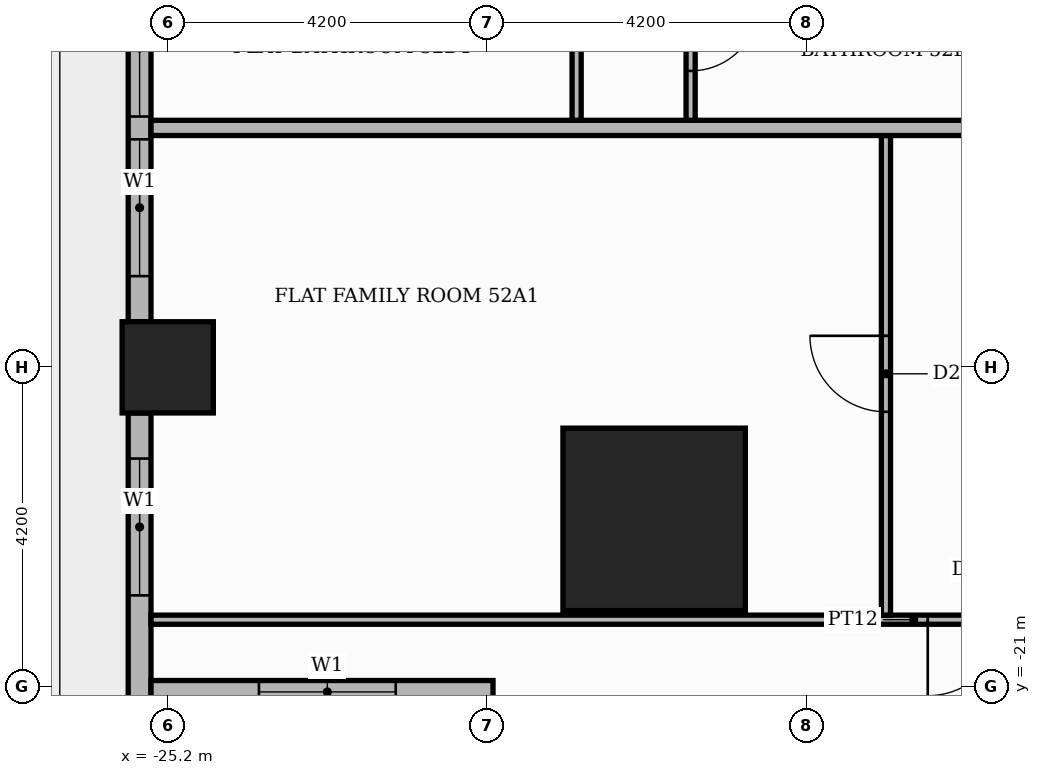
"""IFC4 building model, lengths in metres.
Left out: names, types, materials, properties, quantities, classifications, styles, units other than length and angle.
Written with IfcOpenShell. Run it as: python <this file> out.ifc"""

import sys

from ifc_helpers import new_model, si_unit, direction, frame, frame_2d, origin, origin_2d, place, context, subcontext, project, spatial, rectangle, extrude, element, fill, save


model = new_model("IFC4")
c1 = context("Model", 3, precision=1e-05, world=origin(), true_north=direction((0.0, 1.0)))
c2 = subcontext(c1, "Body", "Model", "MODEL_VIEW")
j1 = project(units=[si_unit("LENGTHUNIT", "METRE"), si_unit("PLANEANGLEUNIT", "RADIAN")], contexts=[c1])
p1 = place(None, origin())
s1 = spatial("IfcSite", under=j1, at=p1, CompositionType="ELEMENT")
p2 = place(p1, origin())
s2 = spatial("IfcBuilding", under=s1, at=p2, CompositionType="ELEMENT")
p3 = place(p2, frame((0.0, 0.0, 219.6)))
s3 = spatial("IfcBuildingStorey", under=s2, at=p3, CompositionType="ELEMENT", Elevation=219.6)
p4 = place(p3, frame((-18.8, -18.8, 0.0), z_axis=(0.0, 0.0, 1.0), x_axis=(1.0, 0.0, 0.0)))
e1 = element("IfcColumn", 1, at=p4, inside=s3, PredefinedType="COLUMN", context=c2, shape_type="SweptSolid", body=[
    extrude(rectangle(XDim=2.4, YDim=2.4, at=origin_2d()), origin(), (0.0, 0.0, 1.0), 3.9),
])
p5 = place(p3, frame((-25.2, -16.8, 0.0), z_axis=(0.0, 0.0, 1.0), x_axis=(1.0, 0.0, 0.0)))
e2 = element("IfcColumn", 2, at=p5, inside=s3, PredefinedType="COLUMN", context=c2, shape_type="SweptSolid", body=[
    extrude(rectangle(XDim=1.2, YDim=1.2, at=origin_2d()), origin(), (0.0, 0.0, 1.0), 3.9),
])
p6 = place(p3, frame((-25.57, -9.0, 0.0), z_axis=(0.0, 0.0, 1.0), x_axis=(0.0, -1.0, 0.0)))
e3 = element("IfcWall", 3, at=p6, inside=s3, PredefinedType="STANDARD", context=c2, shape_type="SweptSolid", body=[
    extrude(rectangle(XDim=7.2, YDim=0.3, at=frame_2d((3.6, 0.0))), origin(), (0.0, 0.0, 1.0), 3.48),
])
p7 = place(p6, frame((0.6, 0.0, 0.9)))
e4 = element("IfcOpeningElement", 4, at=p7, cuts=e3, PredefinedType="OPENING", context=c2, shape_type="SweptSolid", body=[
    extrude(rectangle(XDim=1.8, YDim=2.1, at=frame_2d((0.9, 1.05))), frame((0.0, 0.16, 0.0), z_axis=(0.0, -1.0, 0.0), x_axis=(1.0, 0.0, 0.0)), (0.0, 0.0, 1.0), 0.32),
])
p8 = place(p6, frame((2.7, 0.0, 0.9)))
e5 = element("IfcOpeningElement", 5, at=p8, cuts=e3, PredefinedType="OPENING", context=c2, shape_type="SweptSolid", body=[
    extrude(rectangle(XDim=1.8, YDim=2.1, at=frame_2d((0.9, 1.05))), frame((0.0, 0.16, 0.0), z_axis=(0.0, -1.0, 0.0), x_axis=(1.0, 0.0, 0.0)), (0.0, 0.0, 1.0), 0.32),
])
p9 = place(p6, frame((4.8, 0.0, 0.9)))
e6 = element("IfcOpeningElement", 6, at=p9, cuts=e3, PredefinedType="OPENING", context=c2, shape_type="SweptSolid", body=[
    extrude(rectangle(XDim=1.8, YDim=2.1, at=frame_2d((0.9, 1.05))), frame((0.0, 0.16, 0.0), z_axis=(0.0, -1.0, 0.0), x_axis=(1.0, 0.0, 0.0)), (0.0, 0.0, 1.0), 0.32),
])
p10 = place(p3, frame((-25.57, -17.4, 0.0), z_axis=(0.0, 0.0, 1.0), x_axis=(0.0, -1.0, 0.0)))
e7 = element("IfcWall", 7, at=p10, inside=s3, PredefinedType="STANDARD", context=c2, shape_type="SweptSolid", body=[
    extrude(rectangle(XDim=3.82, YDim=0.3, at=frame_2d((1.91, 0.0))), origin(), (0.0, 0.0, 1.0), 3.48),
])
p11 = place(p10, frame((0.6, 0.0, 0.9)))
e8 = element("IfcOpeningElement", 8, at=p11, cuts=e7, PredefinedType="OPENING", context=c2, shape_type="SweptSolid", body=[
    extrude(rectangle(XDim=1.8, YDim=2.1, at=frame_2d((0.9, 1.05))), frame((0.0, 0.16, 0.0), z_axis=(0.0, -1.0, 0.0), x_axis=(1.0, 0.0, 0.0)), (0.0, 0.0, 1.0), 0.32),
])
p12 = place(p3, frame((-25.42, -21.07, 0.0), z_axis=(0.0, 0.0, 1.0), x_axis=(1.0, 0.0, 0.0)))
e9 = element("IfcWall", 9, at=p12, inside=s3, PredefinedType="STANDARD", context=c2, shape_type="SweptSolid", body=[
    extrude(rectangle(XDim=4.5, YDim=0.3, at=frame_2d((2.25, 0.0))), origin(), (0.0, 0.0, 1.0), 3.48),
])
p13 = place(p12, frame((1.42, 0.0, 0.9)))
e10 = element("IfcOpeningElement", 10, at=p13, cuts=e9, PredefinedType="OPENING", context=c2, shape_type="SweptSolid", body=[
    extrude(rectangle(XDim=1.8, YDim=2.1, at=frame_2d((0.9, 1.05))), frame((0.0, 0.16, 0.0), z_axis=(0.0, -1.0, 0.0), x_axis=(1.0, 0.0, 0.0)), (0.0, 0.0, 1.0), 0.32),
])
p14 = place(p3, frame((-25.42, -20.12, 0.0), z_axis=(0.0, 0.0, 1.0), x_axis=(1.0, 0.0, 0.0)))
e11 = element("IfcWall", 11, at=p14, inside=s3, PredefinedType="PARTITIONING", context=c2, shape_type="SweptSolid", body=[
    extrude(rectangle(XDim=20.07, YDim=0.12, at=frame_2d((10.035, 0.0))), origin(), (0.0, 0.0, 1.0), 3.48),
])
p15 = place(p14, frame((10.22, 0.0, 0.0)))
e12 = element("IfcOpeningElement", 12, at=p15, cuts=e11, PredefinedType="OPENING", context=c2, shape_type="SweptSolid", body=[
    extrude(rectangle(XDim=1.0, YDim=2.1, at=frame_2d((0.5, 1.05))), frame((0.0, 0.07, 0.0), z_axis=(0.0, -1.0, 0.0), x_axis=(1.0, 0.0, 0.0)), (0.0, 0.0, 1.0), 0.14),
])
p16 = place(p14, frame((13.42, 0.0, 0.0)))
e13 = element("IfcOpeningElement", 13, at=p16, cuts=e11, PredefinedType="OPENING", context=c2, shape_type="SweptSolid", body=[
    extrude(rectangle(XDim=0.9, YDim=2.1, at=frame_2d((0.45, 1.05))), frame((0.0, 0.07, 0.0), z_axis=(0.0, -1.0, 0.0), x_axis=(1.0, 0.0, 0.0)), (0.0, 0.0, 1.0), 0.14),
])
p17 = place(p3, frame((-15.75, -20.06, 0.0), z_axis=(0.0, 0.0, 1.0), x_axis=(0.0, 1.0, 0.0)))
e14 = element("IfcWall", 14, at=p17, inside=s3, PredefinedType="PARTITIONING", context=c2, shape_type="SweptSolid", body=[
    extrude(rectangle(XDim=6.31, YDim=0.12, at=frame_2d((3.155, 0.0))), origin(), (0.0, 0.0, 1.0), 3.48),
])
p18 = place(p17, frame((2.675, 0.0, 0.0)))
e15 = element("IfcOpeningElement", 15, at=p18, cuts=e14, PredefinedType="OPENING", context=c2, shape_type="SweptSolid", body=[
    extrude(rectangle(XDim=1.0, YDim=2.1, at=frame_2d((0.5, 1.05))), frame((0.0, 0.07, 0.0), z_axis=(0.0, -1.0, 0.0), x_axis=(1.0, 0.0, 0.0)), (0.0, 0.0, 1.0), 0.14),
])
p19 = place(p3, frame((-25.42, -13.65, 0.0), z_axis=(0.0, 0.0, 1.0), x_axis=(1.0, 0.0, 0.0)))
e16 = element("IfcWall", 16, at=p19, inside=s3, PredefinedType="PARTITIONING", context=c2, shape_type="SweptSolid", body=[
    extrude(rectangle(XDim=39.07, YDim=0.2, at=frame_2d((19.535, 0.0))), origin(), (0.0, 0.0, 1.0), 3.48),
])
p20 = place(p19, frame((13.32, 0.0, 0.0)))
e17 = element("IfcOpeningElement", 17, at=p20, cuts=e16, PredefinedType="OPENING", context=c2, shape_type="SweptSolid", body=[
    extrude(rectangle(XDim=1.1, YDim=2.4, at=frame_2d((0.55, 1.2))), frame((0.0, 0.11, 0.0), z_axis=(0.0, -1.0, 0.0), x_axis=(1.0, 0.0, 0.0)), (0.0, 0.0, 1.0), 0.22),
])
p21 = place(p19, frame((21.72, 0.0, 0.0)))
e18 = element("IfcOpeningElement", 18, at=p21, cuts=e16, PredefinedType="OPENING", context=c2, shape_type="SweptSolid", body=[
    extrude(rectangle(XDim=1.1, YDim=2.4, at=frame_2d((0.55, 1.2))), frame((0.0, 0.11, 0.0), z_axis=(0.0, -1.0, 0.0), x_axis=(1.0, 0.0, 0.0)), (0.0, 0.0, 1.0), 0.22),
])
p22 = place(p3, frame((-19.82, -13.55, 0.0), z_axis=(0.0, 0.0, 1.0), x_axis=(0.0, 1.0, 0.0)))
e19 = element("IfcWall", 19, at=p22, inside=s3, PredefinedType="PARTITIONING", context=c2, shape_type="SweptSolid", body=[
    extrude(rectangle(XDim=1.94, YDim=0.12, at=frame_2d((0.97, 0.0))), origin(), (0.0, 0.0, 1.0), 3.48),
])
p23 = place(p3, frame((-18.32, -13.55, 0.0), z_axis=(0.0, 0.0, 1.0), x_axis=(0.0, 1.0, 0.0)))
e20 = element("IfcWall", 20, at=p23, inside=s3, PredefinedType="PARTITIONING", context=c2, shape_type="SweptSolid", body=[
    extrude(rectangle(XDim=2.24, YDim=0.12, at=frame_2d((1.12, 0.0))), origin(), (0.0, 0.0, 1.0), 3.48),
])
p24 = place(p23, frame((0.65, 0.0, 0.0)))
e21 = element("IfcOpeningElement", 21, at=p24, cuts=e20, PredefinedType="OPENING", context=c2, shape_type="SweptSolid", body=[
    extrude(rectangle(XDim=0.9, YDim=2.1, at=frame_2d((0.45, 1.05))), frame((0.0, 0.07, 0.0), z_axis=(0.0, -1.0, 0.0), x_axis=(1.0, 0.0, 0.0)), (0.0, 0.0, 1.0), 0.14),
])
p25 = place(p8, origin())
e22 = element("IfcWindow", 22, at=p25, inside=s3, PartitioningType="SINGLE_PANEL", PredefinedType="WINDOW", context=c2, shape_type="SweptSolid", body=[
    extrude(rectangle(XDim=1.8, YDim=2.1, at=frame_2d((0.9, 1.05))), frame((0.0, 0.03, 0.0), z_axis=(0.0, -1.0, 0.0), x_axis=(1.0, 0.0, 0.0)), (0.0, 0.0, 1.0), 0.06),
])
fill(e5, e22)
p26 = place(p9, origin())
e23 = element("IfcWindow", 23, at=p26, inside=s3, PartitioningType="SINGLE_PANEL", PredefinedType="WINDOW", context=c2, shape_type="SweptSolid", body=[
    extrude(rectangle(XDim=1.8, YDim=2.1, at=frame_2d((0.9, 1.05))), frame((0.0, 0.03, 0.0), z_axis=(0.0, -1.0, 0.0), x_axis=(1.0, 0.0, 0.0)), (0.0, 0.0, 1.0), 0.06),
])
fill(e6, e23)
p27 = place(p11, origin())
e24 = element("IfcWindow", 24, at=p27, inside=s3, PartitioningType="SINGLE_PANEL", PredefinedType="WINDOW", context=c2, shape_type="SweptSolid", body=[
    extrude(rectangle(XDim=1.8, YDim=2.1, at=frame_2d((0.9, 1.05))), frame((0.0, 0.03, 0.0), z_axis=(0.0, -1.0, 0.0), x_axis=(1.0, 0.0, 0.0)), (0.0, 0.0, 1.0), 0.06),
])
fill(e8, e24)
p28 = place(p13, origin())
e25 = element("IfcWindow", 25, at=p28, inside=s3, PartitioningType="SINGLE_PANEL", PredefinedType="WINDOW", context=c2, shape_type="SweptSolid", body=[
    extrude(rectangle(XDim=1.8, YDim=2.1, at=frame_2d((0.9, 1.05))), frame((0.0, 0.03, 0.0), z_axis=(0.0, -1.0, 0.0), x_axis=(1.0, 0.0, 0.0)), (0.0, 0.0, 1.0), 0.06),
])
fill(e10, e25)
p29 = place(p18, origin())
e26 = element("IfcDoor", 26, at=p29, inside=s3, OperationType="SINGLE_SWING_RIGHT", PredefinedType="DOOR", context=c2, shape_type="SweptSolid", body=[
    extrude(rectangle(XDim=1.0, YDim=2.1, at=frame_2d((0.5, 1.05))), frame((0.0, 0.025, 0.0), z_axis=(0.0, -1.0, 0.0), x_axis=(1.0, 0.0, 0.0)), (0.0, 0.0, 1.0), 0.05),
])
fill(e15, e26)
p30 = place(p15, frame((1.0, 0.0, 0.0), z_axis=(0.0, 0.0, 1.0), x_axis=(-1.0, 0.0, 0.0)))
e27 = element("IfcDoor", 27, at=p30, inside=s3, OperationType="SINGLE_SWING_LEFT", PredefinedType="DOOR", context=c2, shape_type="SweptSolid", body=[
    extrude(rectangle(XDim=1.0, YDim=2.1, at=frame_2d((0.5, 1.05))), frame((0.0, 0.025, 0.0), z_axis=(0.0, -1.0, 0.0), x_axis=(1.0, 0.0, 0.0)), (0.0, 0.0, 1.0), 0.05),
])
fill(e12, e27)
p31 = place(p24, frame((0.9, 0.0, 0.0), z_axis=(0.0, 0.0, 1.0), x_axis=(-1.0, 0.0, 0.0)))
e28 = element("IfcDoor", 28, at=p31, inside=s3, OperationType="SINGLE_SWING_RIGHT", PredefinedType="DOOR", context=c2, shape_type="SweptSolid", body=[
    extrude(rectangle(XDim=0.9, YDim=2.1, at=frame_2d((0.45, 1.05))), frame((0.0, 0.025, 0.0), z_axis=(0.0, -1.0, 0.0), x_axis=(1.0, 0.0, 0.0)), (0.0, 0.0, 1.0), 0.05),
])
fill(e21, e28)
save(model, sys.argv[1])
